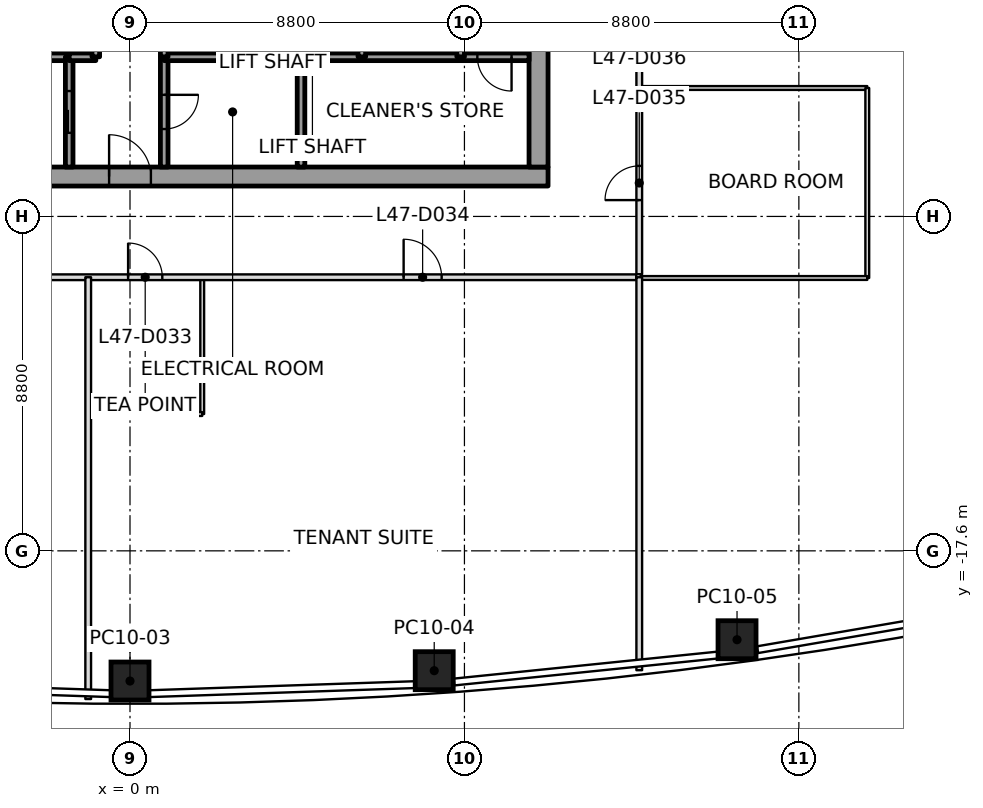
"""IFC4 building model, lengths in metres.
Left out: names, types, materials, properties, quantities, classifications, styles, units other than length and angle.
Written with IfcOpenShell. Run it as: python <this file> out.ifc"""

import sys

from ifc_helpers import new_model, si_unit, direction, frame, frame_2d, origin, origin_2d, place, context, subcontext, project, spatial, rectangle, extrude, clip, halfspace, element, fill, save


model = new_model("IFC4")
c1 = context("Model", 3, precision=1e-05, world=origin(), true_north=direction((0.0, 1.0)))
c2 = subcontext(c1, "Body", "Model", "MODEL_VIEW")
j1 = project(units=[si_unit("LENGTHUNIT", "METRE"), si_unit("PLANEANGLEUNIT", "RADIAN")], contexts=[c1])
p1 = place(None, origin())
s1 = spatial("IfcSite", under=j1, at=p1, CompositionType="ELEMENT")
p2 = place(p1, origin())
s2 = spatial("IfcBuilding", under=s1, at=p2, CompositionType="ELEMENT")
p3 = place(p2, frame((0.0, 0.0, 209.8)))
s3 = spatial("IfcBuildingStorey", under=s2, at=p3, CompositionType="ELEMENT", Elevation=209.8)
p4 = place(p3, frame((0.0, -21.026, 0.0), z_axis=(0.0, 0.01141283087, 0.999934871525), x_axis=(1.0, 0.0, 0.0)))
e1 = element("IfcColumn", 1, at=p4, inside=s3, PredefinedType="COLUMN", context=c2, shape_type="SweptSolid", body=[
    clip(extrude(rectangle(XDim=1.0, YDim=1.0, at=origin_2d()), origin(), (0.0, 0.0, 1.0), 4.0), halfspace(frame((0.0, 0.0, 3.999)), False)),
])
p5 = place(p3, frame((8.005, -20.754, 0.0), z_axis=(-0.008788174922, 0.01116830563, 0.999899013366), x_axis=(0.997653816386, 0.06799057406, 0.008009025544)))
e2 = element("IfcColumn", 2, at=p5, inside=s3, PredefinedType="COLUMN", context=c2, shape_type="SweptSolid", body=[
    clip(extrude(rectangle(XDim=1.0, YDim=1.0, at=origin_2d()), origin(), (0.0, 0.0, 1.0), 4.0), halfspace(frame((0.0, 0.0, 3.999)), False)),
])
p6 = place(p3, frame((15.973, -19.939, 0.0), z_axis=(-0.017574453011, 0.010434831475, 0.999791104628), x_axis=(0.990627244409, 0.135653016155, 0.015997557411)))
e3 = element("IfcColumn", 3, at=p6, inside=s3, PredefinedType="COLUMN", context=c2, shape_type="SweptSolid", body=[
    clip(extrude(rectangle(XDim=1.0, YDim=1.0, at=origin_2d()), origin(), (0.0, 0.0, 1.0), 4.001), halfspace(frame((0.0, 0.0, 3.998)), False)),
])
p7 = place(p3, frame((-11.0, -7.75, 0.0), z_axis=(0.0, 0.0, 1.0), x_axis=(1.0, 0.0, 0.0)))
e4 = element("IfcWall", 4, at=p7, inside=s3, PredefinedType="SHEAR", context=c2, shape_type="SweptSolid", body=[
    extrude(rectangle(XDim=22.0, YDim=0.5, at=frame_2d((11.0, 0.0))), origin(), (0.0, 0.0, 1.0), 4.0),
])
p8 = place(p7, frame((10.45, 0.0, 0.0)))
e5 = element("IfcOpeningElement", 5, at=p8, cuts=e4, PredefinedType="OPENING", context=c2, shape_type="SweptSolid", body=[
    extrude(rectangle(XDim=1.1, YDim=2.1, at=frame_2d((0.55, 1.05))), frame((0.0, 0.25, 0.0), z_axis=(0.0, -1.0, 0.0), x_axis=(1.0, 0.0, 0.0)), (0.0, 0.0, 1.0), 0.5),
])
p9 = place(p3, frame((10.75, -7.5, 0.0), z_axis=(0.0, 0.0, 1.0), x_axis=(0.0, 1.0, 0.0)))
e6 = element("IfcWall", 6, at=p9, inside=s3, PredefinedType="SHEAR", context=c2, shape_type="SweptSolid", body=[
    extrude(rectangle(XDim=15.0, YDim=0.5, at=frame_2d((7.5, 0.0))), origin(), (0.0, 0.0, 1.0), 4.0),
])
p10 = place(p9, frame((6.6, 0.0, 0.0)))
e7 = element("IfcOpeningElement", 7, at=p10, cuts=e6, PredefinedType="OPENING", context=c2, shape_type="SweptSolid", body=[
    extrude(rectangle(XDim=1.8, YDim=2.1, at=frame_2d((0.9, 1.05))), frame((0.0, 0.25, 0.0), z_axis=(0.0, -1.0, 0.0), x_axis=(1.0, 0.0, 0.0)), (0.0, 0.0, 1.0), 0.5),
])
p11 = place(p3, frame((-3.5, -4.6, 0.0), z_axis=(0.0, 0.0, 1.0), x_axis=(1.0, 0.0, 0.0)))
e8 = element("IfcWall", 8, at=p11, inside=s3, PredefinedType="SOLIDWALL", context=c2, shape_type="SweptSolid", body=[
    extrude(rectangle(XDim=1.9, YDim=0.2, at=frame_2d((0.95, 0.0))), origin(), (0.0, 0.0, 1.0), 3.85),
])
p12 = place(p3, frame((-1.6, -7.5, 0.0), z_axis=(0.0, 0.0, 1.0), x_axis=(0.0, 1.0, 0.0)))
e9 = element("IfcWall", 9, at=p12, inside=s3, PredefinedType="SOLIDWALL", context=c2, shape_type="SweptSolid", body=[
    extrude(rectangle(XDim=2.9, YDim=0.2, at=frame_2d((1.45, 0.0))), origin(), (0.0, 0.0, 1.0), 3.85),
])
p13 = place(p12, frame((0.9, 0.0, 0.0)))
e10 = element("IfcOpeningElement", 10, at=p13, cuts=e9, PredefinedType="OPENING", context=c2, shape_type="SweptSolid", body=[
    extrude(rectangle(XDim=1.1, YDim=2.1, at=frame_2d((0.55, 1.05))), frame((0.0, 0.1, 0.0), z_axis=(0.0, -1.0, 0.0), x_axis=(1.0, 0.0, 0.0)), (0.0, 0.0, 1.0), 0.2),
])
p14 = place(p3, frame((-1.6, -4.6, 0.0), z_axis=(0.0, 0.0, 1.0), x_axis=(1.0, 0.0, 0.0)))
e11 = element("IfcWall", 11, at=p14, inside=s3, PredefinedType="SOLIDWALL", context=c2, shape_type="SweptSolid", body=[
    extrude(rectangle(XDim=0.7, YDim=0.2, at=frame_2d((0.35, 0.0))), origin(), (0.0, 0.0, 1.0), 3.85),
])
p15 = place(p3, frame((-0.9, -4.6, 0.0), z_axis=(0.0, 0.0, 1.0), x_axis=(0.0, 1.0, 0.0)))
e12 = element("IfcWall", 12, at=p15, inside=s3, PredefinedType="SOLIDWALL", context=c2, shape_type="SweptSolid", body=[
    extrude(rectangle(XDim=2.8, YDim=0.2, at=frame_2d((1.4, 0.0))), origin(), (0.0, 0.0, 1.0), 3.85),
])
p16 = place(p3, frame((0.9, -4.6, 0.0), z_axis=(0.0, 0.0, 1.0), x_axis=(0.0, -1.0, 0.0)))
e13 = element("IfcWall", 13, at=p16, inside=s3, PredefinedType="SOLIDWALL", context=c2, shape_type="SweptSolid", body=[
    extrude(rectangle(XDim=2.9, YDim=0.2, at=frame_2d((1.45, 0.0))), origin(), (0.0, 0.0, 1.0), 3.85),
])
p17 = place(p16, frame((1.0, 0.0, 0.0)))
e14 = element("IfcOpeningElement", 14, at=p17, cuts=e13, PredefinedType="OPENING", context=c2, shape_type="SweptSolid", body=[
    extrude(rectangle(XDim=0.9, YDim=2.1, at=frame_2d((0.45, 1.05))), frame((0.0, 0.1, 0.0), z_axis=(0.0, -1.0, 0.0), x_axis=(1.0, 0.0, 0.0)), (0.0, 0.0, 1.0), 0.2),
])
p18 = place(p3, frame((3.5, -4.6, 0.0), z_axis=(0.0, 0.0, 1.0), x_axis=(-1.0, 0.0, 0.0)))
e15 = element("IfcWall", 15, at=p18, inside=s3, PredefinedType="SOLIDWALL", context=c2, shape_type="SweptSolid", body=[
    extrude(rectangle(XDim=2.6, YDim=0.2, at=frame_2d((1.3, 0.0))), origin(), (0.0, 0.0, 1.0), 3.85),
])
p19 = place(p3, frame((0.9, -1.8, 0.0), z_axis=(0.0, 0.0, 1.0), x_axis=(0.0, -1.0, 0.0)))
e16 = element("IfcWall", 16, at=p19, inside=s3, PredefinedType="SOLIDWALL", context=c2, shape_type="SweptSolid", body=[
    extrude(rectangle(XDim=2.8, YDim=0.2, at=frame_2d((1.4, 0.0))), origin(), (0.0, 0.0, 1.0), 3.85),
])
p20 = place(p3, frame((4.5, -4.6, 0.0), z_axis=(0.0, 0.0, 1.0), x_axis=(-1.0, 0.0, 0.0)))
e17 = element("IfcWall", 17, at=p20, inside=s3, PredefinedType="SOLIDWALL", context=c2, shape_type="SweptSolid", body=[
    extrude(rectangle(XDim=1.0, YDim=0.2, at=frame_2d((0.5, 0.0))), origin(), (0.0, 0.0, 1.0), 3.85),
])
p21 = place(p3, frame((3.5, -4.6, 0.0), z_axis=(0.0, 0.0, 1.0), x_axis=(0.0, 1.0, 0.0)))
e18 = element("IfcWall", 18, at=p21, inside=s3, PredefinedType="SOLIDWALL", context=c2, shape_type="SweptSolid", body=[
    extrude(rectangle(XDim=2.8, YDim=0.2, at=frame_2d((1.4, 0.0))), origin(), (0.0, 0.0, 1.0), 3.85),
])
p22 = place(p3, frame((4.5, -4.6, 0.0), z_axis=(0.0, 0.0, 1.0), x_axis=(0.0, -1.0, 0.0)))
e19 = element("IfcWall", 19, at=p22, inside=s3, PredefinedType="SOLIDWALL", context=c2, shape_type="SweptSolid", body=[
    extrude(rectangle(XDim=2.9, YDim=0.2, at=frame_2d((1.45, 0.0))), origin(), (0.0, 0.0, 1.0), 3.85),
])
p23 = place(p3, frame((6.1, -4.6, 0.0), z_axis=(0.0, 0.0, 1.0), x_axis=(-1.0, 0.0, 0.0)))
e20 = element("IfcWall", 20, at=p23, inside=s3, PredefinedType="SOLIDWALL", context=c2, shape_type="SweptSolid", body=[
    extrude(rectangle(XDim=1.6, YDim=0.2, at=frame_2d((0.8, 0.0))), origin(), (0.0, 0.0, 1.0), 3.85),
])
p24 = place(p3, frame((8.7, -4.6, 0.0), z_axis=(0.0, 0.0, 1.0), x_axis=(-1.0, 0.0, 0.0)))
e21 = element("IfcWall", 21, at=p24, inside=s3, PredefinedType="SOLIDWALL", context=c2, shape_type="SweptSolid", body=[
    extrude(rectangle(XDim=2.6, YDim=0.2, at=frame_2d((1.3, 0.0))), origin(), (0.0, 0.0, 1.0), 3.85),
])
p25 = place(p3, frame((6.1, -4.6, 0.0), z_axis=(0.0, 0.0, 1.0), x_axis=(0.0, 1.0, 0.0)))
e22 = element("IfcWall", 22, at=p25, inside=s3, PredefinedType="SOLIDWALL", context=c2, shape_type="SweptSolid", body=[
    extrude(rectangle(XDim=2.8, YDim=0.2, at=frame_2d((1.4, 0.0))), origin(), (0.0, 0.0, 1.0), 3.85),
])
p26 = place(p3, frame((10.5, -4.6, 0.0), z_axis=(0.0, 0.0, 1.0), x_axis=(-1.0, 0.0, 0.0)))
e23 = element("IfcWall", 23, at=p26, inside=s3, PredefinedType="SOLIDWALL", context=c2, shape_type="SweptSolid", body=[
    extrude(rectangle(XDim=1.8, YDim=0.2, at=frame_2d((0.9, 0.0))), origin(), (0.0, 0.0, 1.0), 3.85),
])
p27 = place(p26, frame((0.46, 0.0, 0.0)))
e24 = element("IfcOpeningElement", 24, at=p27, cuts=e23, PredefinedType="OPENING", context=c2, shape_type="SweptSolid", body=[
    extrude(rectangle(XDim=0.9, YDim=2.1, at=frame_2d((0.45, 1.05))), frame((0.0, 0.1, 0.0), z_axis=(0.0, -1.0, 0.0), x_axis=(1.0, 0.0, 0.0)), (0.0, 0.0, 1.0), 0.2),
])
p28 = place(p3, frame((8.7, -1.8, 0.0), z_axis=(0.0, 0.0, 1.0), x_axis=(0.0, -1.0, 0.0)))
e25 = element("IfcWall", 25, at=p28, inside=s3, PredefinedType="SOLIDWALL", context=c2, shape_type="SweptSolid", body=[
    extrude(rectangle(XDim=2.8, YDim=0.2, at=frame_2d((1.4, 0.0))), origin(), (0.0, 0.0, 1.0), 3.85),
])
p29 = place(p3, frame((-1.1, -10.4, 0.0), z_axis=(0.0, 0.0, 1.0), x_axis=(0.0, -1.0, 0.0)))
e26 = element("IfcWall", 26, at=p29, inside=s3, PredefinedType="PARTITIONING", context=c2, shape_type="SweptSolid", body=[
    extrude(rectangle(XDim=11.1, YDim=0.15, at=frame_2d((5.55, 0.0))), origin(), (0.0, 0.0, 1.0), 3.134),
])
p30 = place(p3, frame((13.4, -10.4, 0.0), z_axis=(0.0, 0.0, 1.0), x_axis=(0.0, -1.0, 0.0)))
e27 = element("IfcWall", 27, at=p30, inside=s3, PredefinedType="PARTITIONING", context=c2, shape_type="SweptSolid", body=[
    extrude(rectangle(XDim=10.341, YDim=0.15, at=frame_2d((5.17, 0.0))), origin(), (0.0, 0.0, 1.0), 3.134),
])
p31 = place(p3, frame((-13.32, -10.4, 0.0), z_axis=(0.0, 0.0, 1.0), x_axis=(1.0, 0.0, 0.0)))
e28 = element("IfcWall", 28, at=p31, inside=s3, PredefinedType="PARTITIONING", context=c2, shape_type="SweptSolid", body=[
    extrude(rectangle(XDim=26.64, YDim=0.15, at=frame_2d((13.32, 0.0))), origin(), (0.0, 0.0, 1.0), 3.138),
])
p32 = place(p31, frame((0.97, 0.0, 0.0)))
e29 = element("IfcOpeningElement", 29, at=p32, cuts=e28, PredefinedType="OPENING", context=c2, shape_type="SweptSolid", body=[
    extrude(rectangle(XDim=0.9, YDim=2.1, at=frame_2d((0.45, 1.05))), frame((0.0, 0.075, 0.0), z_axis=(0.0, -1.0, 0.0), x_axis=(1.0, 0.0, 0.0)), (0.0, 0.0, 1.0), 0.15),
])
p33 = place(p31, frame((7.12, 0.0, 0.0)))
e30 = element("IfcOpeningElement", 30, at=p33, cuts=e28, PredefinedType="OPENING", context=c2, shape_type="SweptSolid", body=[
    extrude(rectangle(XDim=1.0, YDim=2.1, at=frame_2d((0.5, 1.05))), frame((0.0, 0.075, 0.0), z_axis=(0.0, -1.0, 0.0), x_axis=(1.0, 0.0, 0.0)), (0.0, 0.0, 1.0), 0.15),
])
p34 = place(p31, frame((13.27, 0.0, 0.0)))
e31 = element("IfcOpeningElement", 31, at=p34, cuts=e28, PredefinedType="OPENING", context=c2, shape_type="SweptSolid", body=[
    extrude(rectangle(XDim=0.9, YDim=2.1, at=frame_2d((0.45, 1.05))), frame((0.0, 0.075, 0.0), z_axis=(0.0, -1.0, 0.0), x_axis=(1.0, 0.0, 0.0)), (0.0, 0.0, 1.0), 0.15),
])
p35 = place(p31, frame((20.52, 0.0, 0.0)))
e32 = element("IfcOpeningElement", 32, at=p35, cuts=e28, PredefinedType="OPENING", context=c2, shape_type="SweptSolid", body=[
    extrude(rectangle(XDim=1.0, YDim=2.1, at=frame_2d((0.5, 1.05))), frame((0.0, 0.075, 0.0), z_axis=(0.0, -1.0, 0.0), x_axis=(1.0, 0.0, 0.0)), (0.0, 0.0, 1.0), 0.15),
])
p36 = place(p3, frame((13.4, -10.32, 0.0), z_axis=(0.0, 0.0, 1.0), x_axis=(0.0, 1.0, 0.0)))
e33 = element("IfcWall", 33, at=p36, inside=s3, PredefinedType="PARTITIONING", context=c2, shape_type="SweptSolid", body=[
    extrude(rectangle(XDim=20.64, YDim=0.15, at=frame_2d((10.32, 0.0))), origin(), (0.0, 0.0, 1.0), 3.066),
])
p37 = place(p36, frame((15.22, 0.0, 0.0)))
e34 = element("IfcOpeningElement", 34, at=p37, cuts=e33, PredefinedType="OPENING", context=c2, shape_type="SweptSolid", body=[
    extrude(rectangle(XDim=1.0, YDim=2.1, at=frame_2d((0.5, 1.05))), frame((0.0, 0.075, 0.0), z_axis=(0.0, -1.0, 0.0), x_axis=(1.0, 0.0, 0.0)), (0.0, 0.0, 1.0), 0.15),
])
p38 = place(p36, frame((1.95, 0.0, 0.0)))
e35 = element("IfcOpeningElement", 35, at=p38, cuts=e33, PredefinedType="OPENING", context=c2, shape_type="SweptSolid", body=[
    extrude(rectangle(XDim=0.9, YDim=2.1, at=frame_2d((0.45, 1.05))), frame((0.0, 0.075, 0.0), z_axis=(0.0, -1.0, 0.0), x_axis=(1.0, 0.0, 0.0)), (0.0, 0.0, 1.0), 0.15),
])
p39 = place(p36, frame((7.36, 0.0, 0.0)))
e36 = element("IfcOpeningElement", 36, at=p39, cuts=e33, PredefinedType="OPENING", context=c2, shape_type="SweptSolid", body=[
    extrude(rectangle(XDim=1.0, YDim=2.1, at=frame_2d((0.5, 1.05))), frame((0.0, 0.075, 0.0), z_axis=(0.0, -1.0, 0.0), x_axis=(1.0, 0.0, 0.0)), (0.0, 0.0, 1.0), 0.15),
])
p40 = place(p3, frame((1.9, -10.43, 0.0), z_axis=(0.0, 0.0, 1.0), x_axis=(0.0, -1.0, 0.0)))
e37 = element("IfcWall", 37, at=p40, inside=s3, PredefinedType="PARTITIONING", context=c2, shape_type="SweptSolid", body=[
    extrude(rectangle(XDim=3.57, YDim=0.1, at=frame_2d((1.785, 0.0))), origin(), (0.0, 0.0, 1.0), 3.35),
])
p41 = place(p3, frame((1.9, -14.0, 0.0), z_axis=(0.0, 0.0, 1.0), x_axis=(-1.0, 0.0, 0.0)))
e38 = element("IfcWall", 38, at=p41, inside=s3, PredefinedType="PARTITIONING", context=c2, shape_type="SweptSolid", body=[
    extrude(rectangle(XDim=2.97, YDim=0.1, at=frame_2d((1.485, 0.0))), origin(), (0.0, 0.0, 1.0), 3.138),
])
p42 = place(p3, frame((13.43, -5.42, 0.0), z_axis=(0.0, 0.0, 1.0), x_axis=(1.0, 0.0, 0.0)))
e39 = element("IfcWall", 39, at=p42, inside=s3, PredefinedType="PARTITIONING", context=c2, shape_type="SweptSolid", body=[
    extrude(rectangle(XDim=5.97, YDim=0.1, at=frame_2d((2.985, 0.0))), origin(), (0.0, 0.0, 1.0), 3.138),
])
p43 = place(p3, frame((19.4, -5.42, 0.0), z_axis=(0.0, 0.0, 1.0), x_axis=(0.0, -1.0, 0.0)))
e40 = element("IfcWall", 40, at=p43, inside=s3, PredefinedType="PARTITIONING", context=c2, shape_type="SweptSolid", body=[
    extrude(rectangle(XDim=5.0, YDim=0.1, at=frame_2d((2.5, 0.0))), origin(), (0.0, 0.0, 1.0), 3.138),
])
p44 = place(p3, frame((19.4, -10.42, 0.0), z_axis=(0.0, 0.0, 1.0), x_axis=(-1.0, 0.0, 0.0)))
e41 = element("IfcWall", 41, at=p44, inside=s3, PredefinedType="PARTITIONING", context=c2, shape_type="SweptSolid", body=[
    extrude(rectangle(XDim=5.97, YDim=0.1, at=frame_2d((2.985, 0.0))), origin(), (0.0, 0.0, 1.0), 3.066),
])
p45 = place(p34, origin())
e42 = element("IfcDoor", 42, at=p45, inside=s3, OperationType="SINGLE_SWING_RIGHT", PredefinedType="DOOR", context=c2, shape_type="SweptSolid", body=[
    extrude(rectangle(XDim=0.9, YDim=2.1, at=frame_2d((0.45, 1.05))), frame((0.0, 0.025, 0.0), z_axis=(0.0, -1.0, 0.0), x_axis=(1.0, 0.0, 0.0)), (0.0, 0.0, 1.0), 0.05),
])
fill(e31, e42)
p46 = place(p35, origin())
e43 = element("IfcDoor", 43, at=p46, inside=s3, OperationType="SINGLE_SWING_RIGHT", PredefinedType="DOOR", context=c2, shape_type="SweptSolid", body=[
    extrude(rectangle(XDim=1.0, YDim=2.1, at=frame_2d((0.5, 1.05))), frame((0.0, 0.025, 0.0), z_axis=(0.0, -1.0, 0.0), x_axis=(1.0, 0.0, 0.0)), (0.0, 0.0, 1.0), 0.05),
])
fill(e32, e43)
p47 = place(p38, origin())
e44 = element("IfcDoor", 44, at=p47, inside=s3, OperationType="SINGLE_SWING_RIGHT", PredefinedType="DOOR", context=c2, shape_type="SweptSolid", body=[
    extrude(rectangle(XDim=0.9, YDim=2.1, at=frame_2d((0.45, 1.05))), frame((0.0, 0.025, 0.0), z_axis=(0.0, -1.0, 0.0), x_axis=(1.0, 0.0, 0.0)), (0.0, 0.0, 1.0), 0.05),
])
fill(e35, e44)
p48 = place(p13, origin())
e45 = element("IfcDoor", 45, at=p48, inside=s3, OperationType="SLIDING_TO_LEFT", PredefinedType="DOOR", context=c2, shape_type="SweptSolid", body=[
    extrude(rectangle(XDim=1.1, YDim=2.1, at=frame_2d((0.55, 1.05))), frame((0.0, 0.025, 0.0), z_axis=(0.0, -1.0, 0.0), x_axis=(1.0, 0.0, 0.0)), (0.0, 0.0, 1.0), 0.05),
])
fill(e10, e45)
p49 = place(p27, origin())
e46 = element("IfcDoor", 46, at=p49, inside=s3, OperationType="SINGLE_SWING_LEFT", PredefinedType="DOOR", context=c2, shape_type="SweptSolid", body=[
    extrude(rectangle(XDim=0.9, YDim=2.1, at=frame_2d((0.45, 1.05))), frame((0.0, 0.025, 0.0), z_axis=(0.0, -1.0, 0.0), x_axis=(1.0, 0.0, 0.0)), (0.0, 0.0, 1.0), 0.05),
])
fill(e24, e46)
p50 = place(p17, origin())
e47 = element("IfcDoor", 47, at=p50, inside=s3, OperationType="SINGLE_SWING_LEFT", PredefinedType="DOOR", context=c2, shape_type="SweptSolid", body=[
    extrude(rectangle(XDim=0.9, YDim=2.1, at=frame_2d((0.45, 1.05))), frame((0.0, 0.025, 0.0), z_axis=(0.0, -1.0, 0.0), x_axis=(1.0, 0.0, 0.0)), (0.0, 0.0, 1.0), 0.05),
])
fill(e14, e47)
p51 = place(p8, origin())
e48 = element("IfcDoor", 48, at=p51, inside=s3, OperationType="SINGLE_SWING_LEFT", PredefinedType="DOOR", context=c2, shape_type="SweptSolid", body=[
    extrude(rectangle(XDim=1.1, YDim=2.1, at=frame_2d((0.55, 1.05))), frame((0.0, 0.025, 0.0), z_axis=(0.0, -1.0, 0.0), x_axis=(1.0, 0.0, 0.0)), (0.0, 0.0, 1.0), 0.05),
])
fill(e5, e48)
save(model, sys.argv[1])
